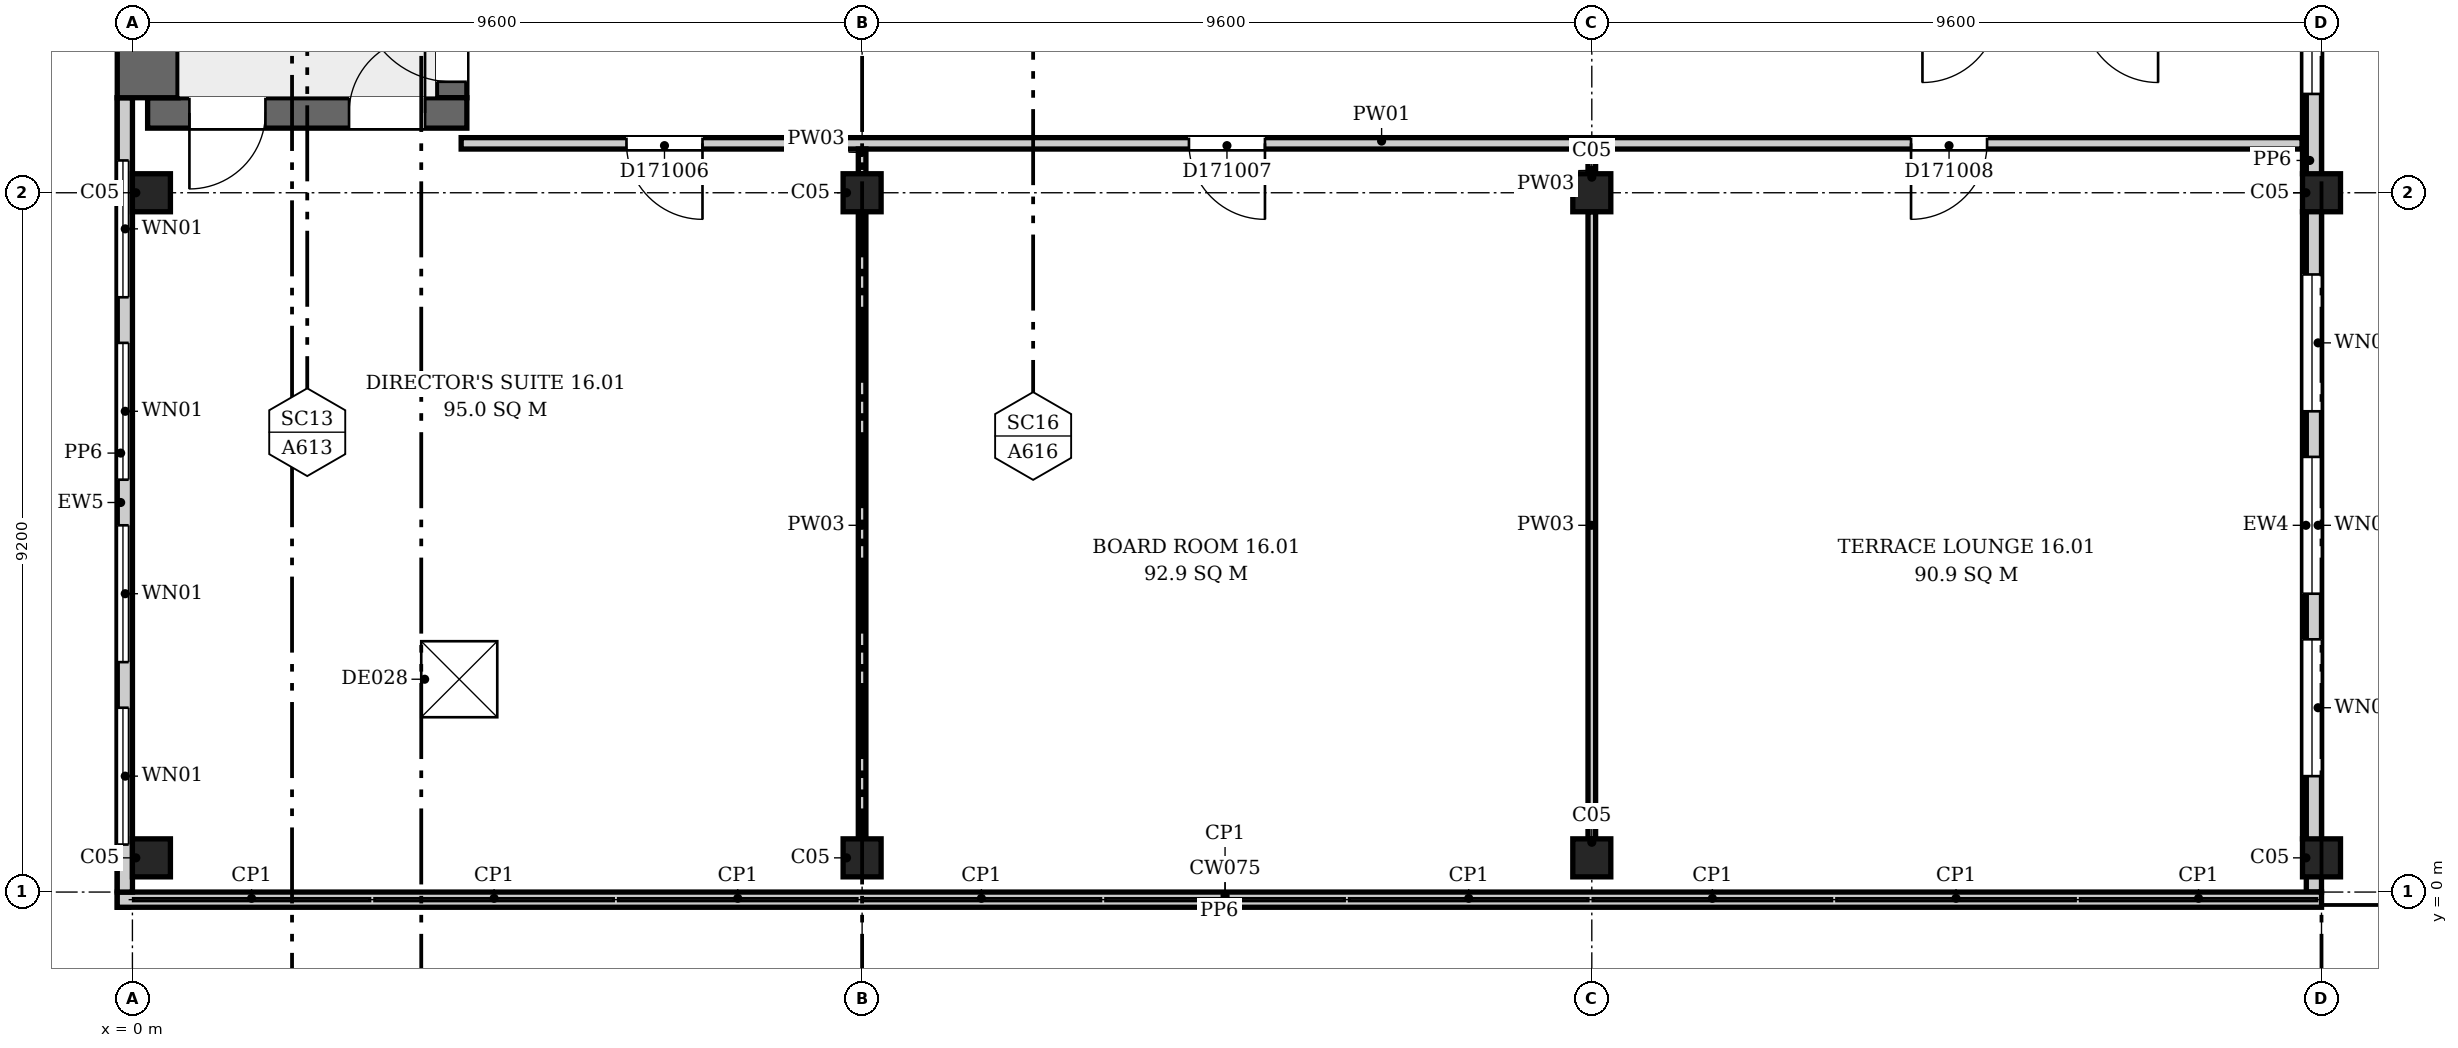
"""IFC4 building model, lengths in metres.
Left out: names, types, materials, properties, quantities, classifications, styles, units other than length and angle.
Written with IfcOpenShell. Run it as: python <this file> out.ifc"""

import sys

from ifc_helpers import new_model, si_unit, direction, frame, frame_2d, origin, origin_2d, place, context, subcontext, project, spatial, rectangle, extrude, element, fill, save


model = new_model("IFC4")
c1 = context("Model", 3, precision=1e-05, world=origin(), true_north=direction((0.0, 1.0)))
c2 = subcontext(c1, "Body", "Model", "MODEL_VIEW")
j1 = project(units=[si_unit("LENGTHUNIT", "METRE"), si_unit("PLANEANGLEUNIT", "RADIAN")], contexts=[c1])
p1 = place(None, origin())
s1 = spatial("IfcSite", under=j1, at=p1, CompositionType="ELEMENT")
p2 = place(p1, origin())
s2 = spatial("IfcBuilding", under=s1, at=p2, CompositionType="ELEMENT")
p3 = place(p2, frame((0.0, 0.0, 78.1)))
s3 = spatial("IfcBuildingStorey", under=s2, at=p3, CompositionType="ELEMENT", Elevation=78.1)
p4 = place(p3, frame((0.2, 10.25, 0.0), z_axis=(0.0, 0.0, 1.0), x_axis=(1.0, 0.0, 0.0)))
e1 = element("IfcWall", 1, at=p4, inside=s3, PredefinedType="SHEAR", context=c2, shape_type="SweptSolid", body=[
    extrude(rectangle(XDim=4.2, YDim=0.4, at=frame_2d((2.1, 0.0))), origin(), (0.0, 0.0, 1.0), 7.1),
])
p5 = place(p4, frame((0.55, 0.0, 4.2)))
e2 = element("IfcOpeningElement", 2, at=p5, cuts=e1, PredefinedType="OPENING", context=c2, shape_type="SweptSolid", body=[
    extrude(rectangle(XDim=1.0, YDim=2.1, at=frame_2d((0.5, 1.05))), frame((0.0, 0.21, 0.0), z_axis=(0.0, -1.0, 0.0), x_axis=(1.0, 0.0, 0.0)), (0.0, 0.0, 1.0), 0.42),
])
p6 = place(p4, frame((2.65, 0.0, 4.2)))
e3 = element("IfcOpeningElement", 3, at=p6, cuts=e1, PredefinedType="OPENING", context=c2, shape_type="SweptSolid", body=[
    extrude(rectangle(XDim=1.0, YDim=2.1, at=frame_2d((0.5, 1.05))), frame((0.0, 0.21, 0.0), z_axis=(0.0, -1.0, 0.0), x_axis=(1.0, 0.0, 0.0)), (0.0, 0.0, 1.0), 0.42),
])
p7 = place(p3, frame((0.2, 10.45, 0.0), z_axis=(0.0, 0.0, 1.0), x_axis=(0.0, 1.0, 0.0)))
e4 = element("IfcWall", 4, at=p7, inside=s3, PredefinedType="SHEAR", context=c2, shape_type="SweptSolid", body=[
    extrude(rectangle(XDim=6.6, YDim=0.8, at=frame_2d((3.3, 0.0))), origin(), (0.0, 0.0, 1.0), 7.1),
])
p8 = place(p3, frame((4.2, 10.45, 0.0), z_axis=(0.0, 0.0, 1.0), x_axis=(0.0, 1.0, 0.0)))
e5 = element("IfcWall", 5, at=p8, inside=s3, PredefinedType="SHEAR", context=c2, shape_type="SweptSolid", body=[
    extrude(rectangle(XDim=6.6, YDim=0.4, at=frame_2d((3.3, 0.0))), origin(), (0.0, 0.0, 1.0), 7.1),
])
p9 = place(p8, frame((0.21, 0.0, 0.0)))
e6 = element("IfcOpeningElement", 6, at=p9, cuts=e5, PredefinedType="OPENING", context=c2, shape_type="SweptSolid", body=[
    extrude(rectangle(XDim=1.2, YDim=2.1, at=frame_2d((0.6, 1.05))), frame((0.0, 0.21, 0.0), z_axis=(0.0, -1.0, 0.0), x_axis=(1.0, 0.0, 0.0)), (0.0, 0.0, 1.0), 0.42),
])
for number, where, z_axis, x_axis in (
    (7, (0.25, 0.45, 0.0), (0.0, 0.0, 1.0), (1.0, 0.0, 0.0)),
    (8, (9.6, 0.45, 0.0), (0.0, 0.0, 1.0), (1.0, 0.0, 0.0)),
    (9, (19.2, 0.45, 0.0), (0.0, 0.0, 1.0), (1.0, 0.0, 0.0)),
    (10, (28.8, 0.45, 0.0), (0.0, 0.0, 1.0), (1.0, 0.0, 0.0)),
    (11, (0.25, 9.2, 0.0), (0.0, 0.0, 1.0), (1.0, 0.0, 0.0)),
    (12, (9.6, 9.2, 0.0), (0.0, 0.0, 1.0), (1.0, 0.0, 0.0)),
    (13, (19.2, 9.2, 0.0), (0.0, 0.0, 1.0), (1.0, 0.0, 0.0)),
    (14, (28.8, 9.2, 0.0), (0.0, 0.0, 1.0), (1.0, 0.0, 0.0)),
):
    element("IfcColumn", number, at=place(p3, frame(where, z_axis=z_axis, x_axis=x_axis)), inside=s3, PredefinedType="COLUMN", context=c2, shape_type="SweptSolid", body=[
        extrude(rectangle(XDim=0.5, YDim=0.5, at=origin_2d()), origin(), (0.0, 0.0, 1.0), 3.9),
    ])
p10 = place(p3, frame((-0.125, 10.45, 0.0), z_axis=(0.0, 0.0, 1.0), x_axis=(0.0, -1.0, 0.0)))
e15 = element("IfcWall", 15, at=p10, inside=s3, PredefinedType="ELEMENTEDWALL", context=c2, shape_type="SweptSolid", body=[
    extrude(rectangle(XDim=10.65, YDim=0.15, at=frame_2d((5.325, 0.0))), origin(), (0.0, 0.0, 1.0), 3.9),
])
p11 = place(p10, frame((8.025, 0.0, 0.9)))
e16 = element("IfcOpeningElement", 16, at=p11, cuts=e15, PredefinedType="OPENING", context=c2, shape_type="SweptSolid", body=[
    extrude(rectangle(XDim=1.8, YDim=2.6, at=frame_2d((0.9, 1.3))), frame((0.0, 0.085, 0.0), z_axis=(0.0, -1.0, 0.0), x_axis=(1.0, 0.0, 0.0)), (0.0, 0.0, 1.0), 0.17),
])
p12 = place(p10, frame((5.625, 0.0, 0.9)))
e17 = element("IfcOpeningElement", 17, at=p12, cuts=e15, PredefinedType="OPENING", context=c2, shape_type="SweptSolid", body=[
    extrude(rectangle(XDim=1.8, YDim=2.6, at=frame_2d((0.9, 1.3))), frame((0.0, 0.085, 0.0), z_axis=(0.0, -1.0, 0.0), x_axis=(1.0, 0.0, 0.0)), (0.0, 0.0, 1.0), 0.17),
])
p13 = place(p10, frame((3.225, 0.0, 0.9)))
e18 = element("IfcOpeningElement", 18, at=p13, cuts=e15, PredefinedType="OPENING", context=c2, shape_type="SweptSolid", body=[
    extrude(rectangle(XDim=1.8, YDim=2.6, at=frame_2d((0.9, 1.3))), frame((0.0, 0.085, 0.0), z_axis=(0.0, -1.0, 0.0), x_axis=(1.0, 0.0, 0.0)), (0.0, 0.0, 1.0), 0.17),
])
p14 = place(p10, frame((0.825, 0.0, 0.9)))
e19 = element("IfcOpeningElement", 19, at=p14, cuts=e15, PredefinedType="OPENING", context=c2, shape_type="SweptSolid", body=[
    extrude(rectangle(XDim=1.8, YDim=2.6, at=frame_2d((0.9, 1.3))), frame((0.0, 0.085, 0.0), z_axis=(0.0, -1.0, 0.0), x_axis=(1.0, 0.0, 0.0)), (0.0, 0.0, 1.0), 0.17),
])
p15 = place(p3, frame((28.675, 0.7, 0.0), z_axis=(0.0, 0.0, 1.0), x_axis=(0.0, 1.0, 0.0)))
e20 = element("IfcWall", 20, at=p15, inside=s3, PredefinedType="ELEMENTEDWALL", context=c2, shape_type="SweptSolid", body=[
    extrude(rectangle(XDim=8.25, YDim=0.25, at=frame_2d((4.125, 0.0))), origin(), (0.0, 0.0, 1.0), 3.9),
])
p16 = place(p15, frame((0.825, 0.0, 0.9)))
e21 = element("IfcOpeningElement", 21, at=p16, cuts=e20, PredefinedType="OPENING", context=c2, shape_type="SweptSolid", body=[
    extrude(rectangle(XDim=1.8, YDim=2.6, at=frame_2d((0.9, 1.3))), frame((0.0, 0.135, 0.0), z_axis=(0.0, -1.0, 0.0), x_axis=(1.0, 0.0, 0.0)), (0.0, 0.0, 1.0), 0.27),
])
p17 = place(p15, frame((3.225, 0.0, 0.9)))
e22 = element("IfcOpeningElement", 22, at=p17, cuts=e20, PredefinedType="OPENING", context=c2, shape_type="SweptSolid", body=[
    extrude(rectangle(XDim=1.8, YDim=2.6, at=frame_2d((0.9, 1.3))), frame((0.0, 0.135, 0.0), z_axis=(0.0, -1.0, 0.0), x_axis=(1.0, 0.0, 0.0)), (0.0, 0.0, 1.0), 0.27),
])
p18 = place(p15, frame((5.625, 0.0, 0.9)))
e23 = element("IfcOpeningElement", 23, at=p18, cuts=e20, PredefinedType="OPENING", context=c2, shape_type="SweptSolid", body=[
    extrude(rectangle(XDim=1.8, YDim=2.6, at=frame_2d((0.9, 1.3))), frame((0.0, 0.135, 0.0), z_axis=(0.0, -1.0, 0.0), x_axis=(1.0, 0.0, 0.0)), (0.0, 0.0, 1.0), 0.27),
])
p19 = place(p3, frame((28.675, 9.45, 0.0), z_axis=(0.0, 0.0, 1.0), x_axis=(0.0, 1.0, 0.0)))
e24 = element("IfcWall", 24, at=p19, inside=s3, PredefinedType="ELEMENTEDWALL", context=c2, shape_type="SweptSolid", body=[
    extrude(rectangle(XDim=8.7, YDim=0.25, at=frame_2d((4.35, 0.0))), origin(), (0.0, 0.0, 1.0), 3.9),
])
p20 = place(p19, frame((3.45, 0.0, 0.0)))
e25 = element("IfcOpeningElement", 25, at=p20, cuts=e24, PredefinedType="OPENING", context=c2, shape_type="SweptSolid", body=[
    extrude(rectangle(XDim=1.8, YDim=2.4, at=frame_2d((0.9, 1.2))), frame((0.0, 0.135, 0.0), z_axis=(0.0, -1.0, 0.0), x_axis=(1.0, 0.0, 0.0)), (0.0, 0.0, 1.0), 0.27),
])
p21 = place(p19, frame((1.05, 0.0, 0.9)))
e26 = element("IfcOpeningElement", 26, at=p21, cuts=e24, PredefinedType="OPENING", context=c2, shape_type="SweptSolid", body=[
    extrude(rectangle(XDim=1.8, YDim=2.6, at=frame_2d((0.9, 1.3))), frame((0.0, 0.135, 0.0), z_axis=(0.0, -1.0, 0.0), x_axis=(1.0, 0.0, 0.0)), (0.0, 0.0, 1.0), 0.27),
])
p22 = place(p19, frame((5.85, 0.0, 0.9)))
e27 = element("IfcOpeningElement", 27, at=p22, cuts=e24, PredefinedType="OPENING", context=c2, shape_type="SweptSolid", body=[
    extrude(rectangle(XDim=1.8, YDim=2.6, at=frame_2d((0.9, 1.3))), frame((0.0, 0.135, 0.0), z_axis=(0.0, -1.0, 0.0), x_axis=(1.0, 0.0, 0.0)), (0.0, 0.0, 1.0), 0.27),
])
p23 = place(p3, frame((-0.199, -0.1, 4.2), z_axis=(0.0, 0.0, 1.0), x_axis=(1.0, 0.0, 0.0)))
e28 = element("IfcWall", 28, at=p23, inside=s3, PredefinedType="PARAPET", context=c2, shape_type="SweptSolid", body=[
    extrude(rectangle(XDim=29.0, YDim=0.2, at=frame_2d((14.5, 0.0))), origin(), (0.0, 0.0, 1.0), 1.1),
])
p24 = place(p3, frame((28.7, 0.0, 4.2), z_axis=(0.0, 0.0, 1.0), x_axis=(0.0, 1.0, 0.0)))
e29 = element("IfcWall", 29, at=p24, inside=s3, PredefinedType="PARAPET", context=c2, shape_type="SweptSolid", body=[
    extrude(rectangle(XDim=18.65, YDim=0.2, at=frame_2d((9.325, 0.0))), origin(), (0.0, 0.0, 1.0), 1.1),
])
p25 = place(p3, frame((-0.099, 10.45, 4.2), z_axis=(0.0, 0.0, 1.0), x_axis=(0.0, -1.0, 0.0)))
e30 = element("IfcWall", 30, at=p25, inside=s3, PredefinedType="PARAPET", context=c2, shape_type="SweptSolid", body=[
    extrude(rectangle(XDim=10.45, YDim=0.2, at=frame_2d((5.225, 0.0))), origin(), (0.0, 0.0, 1.0), 1.1),
])
p26 = place(p3, frame((4.325, 9.85, 0.0), z_axis=(0.0, 0.0, 1.0), x_axis=(1.0, 0.0, 0.0)))
e31 = element("IfcWall", 31, at=p26, inside=s3, PredefinedType="PARTITIONING", context=c2, shape_type="SweptSolid", body=[
    extrude(rectangle(XDim=24.219, YDim=0.15, at=frame_2d((12.109, 0.0))), origin(), (0.0, 0.0, 1.0), 3.9),
])
p27 = place(p26, frame((2.175, 0.0, 0.0)))
e32 = element("IfcOpeningElement", 32, at=p27, cuts=e31, PredefinedType="OPENING", context=c2, shape_type="SweptSolid", body=[
    extrude(rectangle(XDim=1.0, YDim=2.1, at=frame_2d((0.5, 1.05))), frame((0.0, 0.085, 0.0), z_axis=(0.0, -1.0, 0.0), x_axis=(1.0, 0.0, 0.0)), (0.0, 0.0, 1.0), 0.17),
])
p28 = place(p26, frame((9.575, 0.0, 0.0)))
e33 = element("IfcOpeningElement", 33, at=p28, cuts=e31, PredefinedType="OPENING", context=c2, shape_type="SweptSolid", body=[
    extrude(rectangle(XDim=1.0, YDim=2.1, at=frame_2d((0.5, 1.05))), frame((0.0, 0.085, 0.0), z_axis=(0.0, -1.0, 0.0), x_axis=(1.0, 0.0, 0.0)), (0.0, 0.0, 1.0), 0.17),
])
p29 = place(p26, frame((19.075, 0.0, 0.0)))
e34 = element("IfcOpeningElement", 34, at=p29, cuts=e31, PredefinedType="OPENING", context=c2, shape_type="SweptSolid", body=[
    extrude(rectangle(XDim=1.0, YDim=2.1, at=frame_2d((0.5, 1.05))), frame((0.0, 0.085, 0.0), z_axis=(0.0, -1.0, 0.0), x_axis=(1.0, 0.0, 0.0)), (0.0, 0.0, 1.0), 0.17),
])
p30 = place(p3, frame((9.6, 0.7, 0.0), z_axis=(0.0, 0.0, 1.0), x_axis=(0.0, 1.0, 0.0)))
e35 = element("IfcWall", 35, at=p30, inside=s3, PredefinedType="PARTITIONING", context=c2, shape_type="SweptSolid", body=[
    extrude(rectangle(XDim=8.25, YDim=0.1, at=frame_2d((4.125, 0.0))), origin(), (0.0, 0.0, 1.0), 3.9),
])
p31 = place(p3, frame((9.6, 9.45, 0.0), z_axis=(0.0, 0.0, 1.0), x_axis=(0.0, 1.0, 0.0)))
e36 = element("IfcWall", 36, at=p31, inside=s3, PredefinedType="PARTITIONING", context=c2, shape_type="SweptSolid", body=[
    extrude(rectangle(XDim=0.325, YDim=0.1, at=frame_2d((0.163, 0.0))), origin(), (0.0, 0.0, 1.0), 3.9),
])
p32 = place(p3, frame((19.2, 0.7, 0.0), z_axis=(0.0, 0.0, 1.0), x_axis=(0.0, 1.0, 0.0)))
e37 = element("IfcWall", 37, at=p32, inside=s3, PredefinedType="PARTITIONING", context=c2, shape_type="SweptSolid", body=[
    extrude(rectangle(XDim=8.25, YDim=0.1, at=frame_2d((4.125, 0.0))), origin(), (0.0, 0.0, 1.0), 3.9),
])
p33 = place(p3, frame((19.2, 9.45, 0.0), z_axis=(0.0, 0.0, 1.0), x_axis=(0.0, 1.0, 0.0)))
e38 = element("IfcWall", 38, at=p33, inside=s3, PredefinedType="PARTITIONING", context=c2, shape_type="SweptSolid", body=[
    extrude(rectangle(XDim=0.325, YDim=0.1, at=frame_2d((0.163, 0.0))), origin(), (0.0, 0.0, 1.0), 3.9),
])
p34 = place(p11, origin())
e39 = element("IfcWindow", 39, at=p34, inside=s3, PartitioningType="SINGLE_PANEL", PredefinedType="WINDOW", context=c2, shape_type="SweptSolid", body=[
    extrude(rectangle(XDim=1.8, YDim=2.6, at=frame_2d((0.9, 1.3))), frame((0.0, 0.03, 0.0), z_axis=(0.0, -1.0, 0.0), x_axis=(1.0, 0.0, 0.0)), (0.0, 0.0, 1.0), 0.06),
])
fill(e16, e39)
p35 = place(p12, origin())
e40 = element("IfcWindow", 40, at=p35, inside=s3, PartitioningType="SINGLE_PANEL", PredefinedType="WINDOW", context=c2, shape_type="SweptSolid", body=[
    extrude(rectangle(XDim=1.8, YDim=2.6, at=frame_2d((0.9, 1.3))), frame((0.0, 0.03, 0.0), z_axis=(0.0, -1.0, 0.0), x_axis=(1.0, 0.0, 0.0)), (0.0, 0.0, 1.0), 0.06),
])
fill(e17, e40)
p36 = place(p13, origin())
e41 = element("IfcWindow", 41, at=p36, inside=s3, PartitioningType="SINGLE_PANEL", PredefinedType="WINDOW", context=c2, shape_type="SweptSolid", body=[
    extrude(rectangle(XDim=1.8, YDim=2.6, at=frame_2d((0.9, 1.3))), frame((0.0, 0.03, 0.0), z_axis=(0.0, -1.0, 0.0), x_axis=(1.0, 0.0, 0.0)), (0.0, 0.0, 1.0), 0.06),
])
fill(e18, e41)
p37 = place(p14, origin())
e42 = element("IfcWindow", 42, at=p37, inside=s3, PartitioningType="SINGLE_PANEL", PredefinedType="WINDOW", context=c2, shape_type="SweptSolid", body=[
    extrude(rectangle(XDim=1.8, YDim=2.6, at=frame_2d((0.9, 1.3))), frame((0.0, 0.03, 0.0), z_axis=(0.0, -1.0, 0.0), x_axis=(1.0, 0.0, 0.0)), (0.0, 0.0, 1.0), 0.06),
])
fill(e19, e42)
p38 = place(p16, origin())
e43 = element("IfcWindow", 43, at=p38, inside=s3, PartitioningType="SINGLE_PANEL", PredefinedType="WINDOW", context=c2, shape_type="SweptSolid", body=[
    extrude(rectangle(XDim=1.8, YDim=2.6, at=frame_2d((0.9, 1.3))), frame((0.0, 0.03, 0.0), z_axis=(0.0, -1.0, 0.0), x_axis=(1.0, 0.0, 0.0)), (0.0, 0.0, 1.0), 0.06),
])
fill(e21, e43)
p39 = place(p17, origin())
e44 = element("IfcWindow", 44, at=p39, inside=s3, PartitioningType="SINGLE_PANEL", PredefinedType="WINDOW", context=c2, shape_type="SweptSolid", body=[
    extrude(rectangle(XDim=1.8, YDim=2.6, at=frame_2d((0.9, 1.3))), frame((0.0, 0.03, 0.0), z_axis=(0.0, -1.0, 0.0), x_axis=(1.0, 0.0, 0.0)), (0.0, 0.0, 1.0), 0.06),
])
fill(e22, e44)
p40 = place(p18, origin())
e45 = element("IfcWindow", 45, at=p40, inside=s3, PartitioningType="SINGLE_PANEL", PredefinedType="WINDOW", context=c2, shape_type="SweptSolid", body=[
    extrude(rectangle(XDim=1.8, YDim=2.6, at=frame_2d((0.9, 1.3))), frame((0.0, 0.03, 0.0), z_axis=(0.0, -1.0, 0.0), x_axis=(1.0, 0.0, 0.0)), (0.0, 0.0, 1.0), 0.06),
])
fill(e23, e45)
p41 = place(p21, origin())
e46 = element("IfcWindow", 46, at=p41, inside=s3, PartitioningType="SINGLE_PANEL", PredefinedType="WINDOW", context=c2, shape_type="SweptSolid", body=[
    extrude(rectangle(XDim=1.8, YDim=2.6, at=frame_2d((0.9, 1.3))), frame((0.0, 0.03, 0.0), z_axis=(0.0, -1.0, 0.0), x_axis=(1.0, 0.0, 0.0)), (0.0, 0.0, 1.0), 0.06),
])
fill(e26, e46)
p42 = place(p2, frame((0.0, 0.0, 82.3)))
p43 = place(p42, frame((0.0, 0.0, -0.3)))
p44 = place(p43, frame((2.1, 2.6, 0.0)))
p45 = place(p44, frame((0.0, 0.0, 0.25)))
e47 = element("IfcWindow", 47, at=p45, inside=s3, PartitioningType="SINGLE_PANEL", PredefinedType="SKYLIGHT", context=c2, shape_type="SweptSolid", body=[
    extrude(rectangle(XDim=1.8, YDim=3.0, at=origin_2d()), origin(), (0.0, 0.0, 1.0), 0.05),
])
p46 = place(p43, frame((7.6, 2.6, 0.0)))
p47 = place(p46, frame((0.0, 0.0, 0.25)))
e48 = element("IfcWindow", 48, at=p47, inside=s3, PartitioningType="SINGLE_PANEL", PredefinedType="SKYLIGHT", context=c2, shape_type="SweptSolid", body=[
    extrude(rectangle(XDim=1.8, YDim=3.0, at=origin_2d()), origin(), (0.0, 0.0, 1.0), 0.05),
])
p48 = place(p43, frame((13.1, 2.6, 0.0)))
p49 = place(p48, frame((0.0, 0.0, 0.25)))
e49 = element("IfcWindow", 49, at=p49, inside=s3, PartitioningType="SINGLE_PANEL", PredefinedType="SKYLIGHT", context=c2, shape_type="SweptSolid", body=[
    extrude(rectangle(XDim=1.8, YDim=3.0, at=origin_2d()), origin(), (0.0, 0.0, 1.0), 0.05),
])
p50 = place(p43, frame((4.3, 2.8, 0.0)))
p51 = place(p50, frame((0.0, 0.0, 0.25)))
e50 = element("IfcDoor", 50, at=p51, inside=s3, OperationType="SWING_FIXED_LEFT", PredefinedType="TRAPDOOR", context=c2, shape_type="SweptSolid", body=[
    extrude(rectangle(XDim=1.0, YDim=1.0, at=origin_2d()), origin(), (0.0, 0.0, 1.0), 0.05),
])
p52 = place(p9, origin())
e51 = element("IfcDoor", 51, at=p52, inside=s3, OperationType="SINGLE_SWING_RIGHT", PredefinedType="DOOR", context=c2, shape_type="SweptSolid", body=[
    extrude(rectangle(XDim=1.2, YDim=2.1, at=frame_2d((0.6, 1.05))), frame((0.0, 0.025, 0.0), z_axis=(0.0, -1.0, 0.0), x_axis=(1.0, 0.0, 0.0)), (0.0, 0.0, 1.0), 0.05),
])
fill(e6, e51)
p53 = place(p5, frame((1.0, 0.0, 0.0), z_axis=(0.0, 0.0, 1.0), x_axis=(-1.0, 0.0, 0.0)))
e52 = element("IfcDoor", 52, at=p53, inside=s3, OperationType="SINGLE_SWING_LEFT", PredefinedType="DOOR", context=c2, shape_type="SweptSolid", body=[
    extrude(rectangle(XDim=1.0, YDim=2.1, at=frame_2d((0.5, 1.05))), frame((0.0, 0.025, 0.0), z_axis=(0.0, -1.0, 0.0), x_axis=(1.0, 0.0, 0.0)), (0.0, 0.0, 1.0), 0.05),
])
fill(e2, e52)
p54 = place(p6, frame((1.0, 0.0, 0.0), z_axis=(0.0, 0.0, 1.0), x_axis=(-1.0, 0.0, 0.0)))
e53 = element("IfcDoor", 53, at=p54, inside=s3, OperationType="SINGLE_SWING_RIGHT", PredefinedType="DOOR", context=c2, shape_type="SweptSolid", body=[
    extrude(rectangle(XDim=1.0, YDim=2.1, at=frame_2d((0.5, 1.05))), frame((0.0, 0.025, 0.0), z_axis=(0.0, -1.0, 0.0), x_axis=(1.0, 0.0, 0.0)), (0.0, 0.0, 1.0), 0.05),
])
fill(e3, e53)
p55 = place(p27, origin())
e54 = element("IfcDoor", 54, at=p55, inside=s3, OperationType="SINGLE_SWING_RIGHT", PredefinedType="DOOR", context=c2, shape_type="SweptSolid", body=[
    extrude(rectangle(XDim=1.0, YDim=2.1, at=frame_2d((0.5, 1.05))), frame((0.0, 0.025, 0.0), z_axis=(0.0, -1.0, 0.0), x_axis=(1.0, 0.0, 0.0)), (0.0, 0.0, 1.0), 0.05),
])
fill(e32, e54)
p56 = place(p28, origin())
e55 = element("IfcDoor", 55, at=p56, inside=s3, OperationType="SINGLE_SWING_RIGHT", PredefinedType="DOOR", context=c2, shape_type="SweptSolid", body=[
    extrude(rectangle(XDim=1.0, YDim=2.1, at=frame_2d((0.5, 1.05))), frame((0.0, 0.025, 0.0), z_axis=(0.0, -1.0, 0.0), x_axis=(1.0, 0.0, 0.0)), (0.0, 0.0, 1.0), 0.05),
])
fill(e33, e55)
p57 = place(p29, origin())
e56 = element("IfcDoor", 56, at=p57, inside=s3, OperationType="SINGLE_SWING_LEFT", PredefinedType="DOOR", context=c2, shape_type="SweptSolid", body=[
    extrude(rectangle(XDim=1.0, YDim=2.1, at=frame_2d((0.5, 1.05))), frame((0.0, 0.025, 0.0), z_axis=(0.0, -1.0, 0.0), x_axis=(1.0, 0.0, 0.0)), (0.0, 0.0, 1.0), 0.05),
])
fill(e34, e56)
save(model, sys.argv[1])
